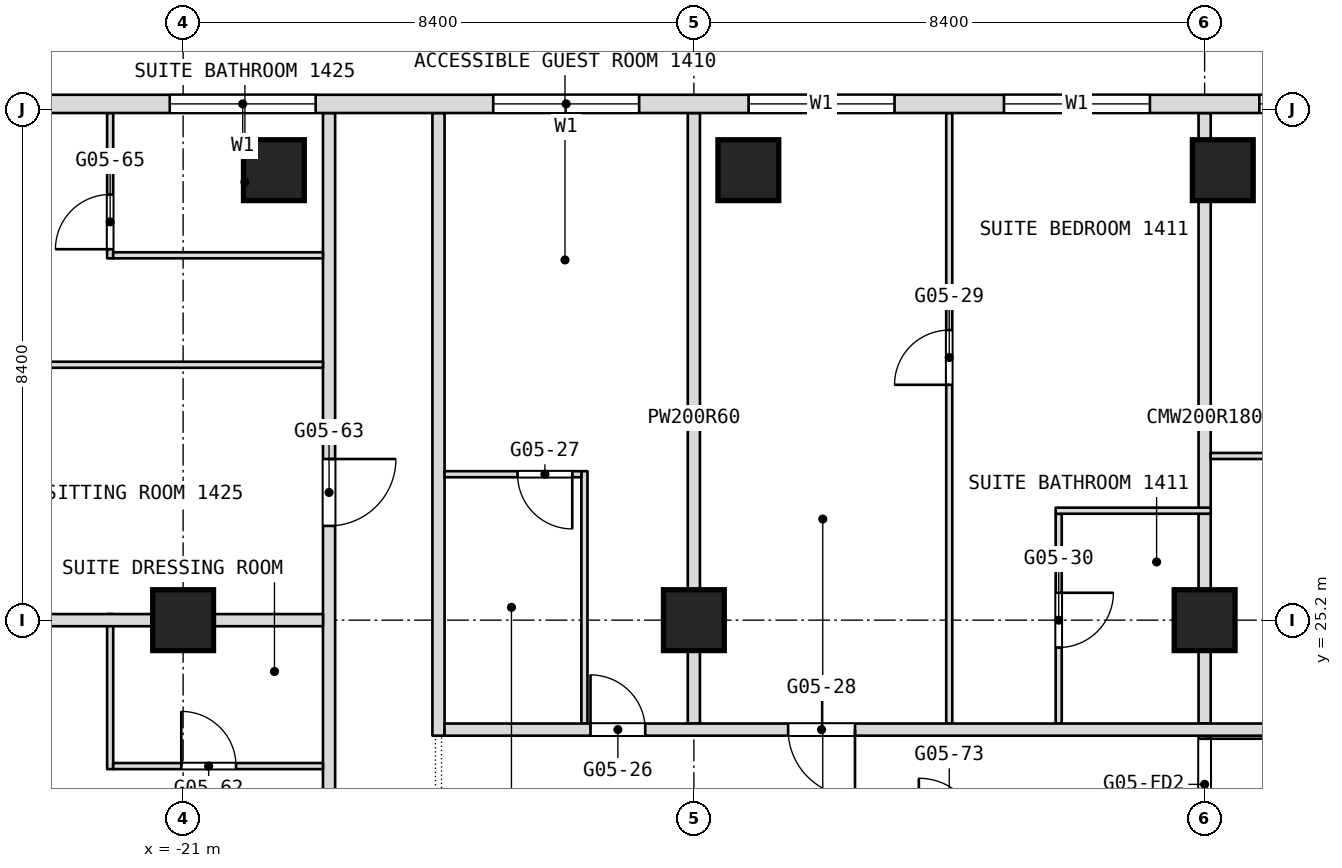
"""IFC4 building model, lengths in metres.
Left out: names, types, materials, properties, quantities, classifications, styles, units other than length and angle.
Written with IfcOpenShell. Run it as: python <this file> out.ifc"""

import sys

from ifc_helpers import new_model, si_unit, direction, frame, frame_2d, origin, origin_2d, place, context, subcontext, project, spatial, rectangle, extrude, element, fill, save


model = new_model("IFC4")
c1 = context("Model", 3, precision=1e-05, world=origin(), true_north=direction((0.0, 1.0)))
c2 = subcontext(c1, "Body", "Model", "MODEL_VIEW")
j1 = project(units=[si_unit("LENGTHUNIT", "METRE"), si_unit("PLANEANGLEUNIT", "RADIAN")], contexts=[c1])
p1 = place(None, origin())
s1 = spatial("IfcSite", under=j1, at=p1, CompositionType="ELEMENT")
p2 = place(p1, origin())
s2 = spatial("IfcBuilding", under=s1, at=p2, CompositionType="ELEMENT")
p3 = place(p2, frame((0.0, 0.0, 65.3)))
s3 = spatial("IfcBuildingStorey", under=s2, at=p3, CompositionType="ELEMENT", Elevation=65.3)
for number, where, z_axis, x_axis in (
    (1, (-21.0, 25.2, 0.0), (0.0, 0.0, 1.0), (1.0, 0.0, 0.0)),
    (2, (-12.6, 25.2, 0.0), (0.0, 0.0, 1.0), (1.0, 0.0, 0.0)),
    (3, (-4.2, 25.2, 0.0), (0.0, 0.0, 1.0), (1.0, 0.0, 0.0)),
    (4, (-19.507, 32.6, 0.0), (0.0, 0.0, 1.0), (1.0, 0.0, 0.0)),
    (5, (-11.704, 32.6, 0.0), (0.0, 0.0, 1.0), (1.0, 0.0, 0.0)),
    (6, (-3.901, 32.6, 0.0), (0.0, 0.0, 1.0), (1.0, 0.0, 0.0)),
):
    element("IfcColumn", number, at=place(p3, frame(where, z_axis=z_axis, x_axis=x_axis)), inside=s3, PredefinedType="COLUMN", context=c2, shape_type="SweptSolid", body=[
        extrude(rectangle(XDim=1.0, YDim=1.0, at=origin_2d()), origin(), (0.0, 0.0, 1.0), 3.6),
    ])
p4 = place(p3, frame((-4.2, 16.8, 0.0), z_axis=(0.0, 0.0, 1.0), x_axis=(0.0, 1.0, 0.0)))
e7 = element("IfcWall", 7, at=p4, inside=s3, PredefinedType="PARTITIONING", context=c2, shape_type="SweptSolid", body=[
    extrude(rectangle(XDim=6.7, YDim=0.2, at=frame_2d((3.35, 0.0))), origin(), (0.0, 0.0, 1.0), 3.34),
])
p5 = place(p4, frame((0.15, 0.0, 0.0)))
e8 = element("IfcOpeningElement", 8, at=p5, cuts=e7, PredefinedType="OPENING", context=c2, shape_type="SweptSolid", body=[
    extrude(rectangle(XDim=1.5, YDim=2.1, at=frame_2d((0.75, 1.05))), frame((0.0, 0.1, 0.0), z_axis=(0.0, -1.0, 0.0), x_axis=(1.0, 0.0, 0.0)), (0.0, 0.0, 1.0), 0.2),
])
p6 = place(p4, frame((4.95, 0.0, 0.0)))
e9 = element("IfcOpeningElement", 9, at=p6, cuts=e7, PredefinedType="OPENING", context=c2, shape_type="SweptSolid", body=[
    extrude(rectangle(XDim=1.5, YDim=2.1, at=frame_2d((0.75, 1.05))), frame((0.0, 0.1, 0.0), z_axis=(0.0, -1.0, 0.0), x_axis=(1.0, 0.0, 0.0)), (0.0, 0.0, 1.0), 0.2),
])
p7 = place(p3, frame((-4.2, 23.5, 0.0), z_axis=(0.0, 0.0, 1.0), x_axis=(0.0, 1.0, 0.0)))
e10 = element("IfcWall", 10, at=p7, inside=s3, PredefinedType="PARTITIONING", context=c2, shape_type="SweptSolid", body=[
    extrude(rectangle(XDim=10.04, YDim=0.2, at=frame_2d((5.02, 0.0))), origin(), (0.0, 0.0, 1.0), 3.34),
])
p8 = place(p3, frame((-6.6, 23.5, 0.0), z_axis=(0.0, 0.0, 1.0), x_axis=(0.0, 1.0, 0.0)))
e11 = element("IfcWall", 11, at=p8, inside=s3, PredefinedType="PARTITIONING", context=c2, shape_type="SweptSolid", body=[
    extrude(rectangle(XDim=3.45, YDim=0.1, at=frame_2d((1.725, 0.0))), origin(), (0.0, 0.0, 1.0), 3.34),
])
p9 = place(p8, frame((1.25, 0.0, 0.0)))
e12 = element("IfcOpeningElement", 12, at=p9, cuts=e11, PredefinedType="OPENING", context=c2, shape_type="SweptSolid", body=[
    extrude(rectangle(XDim=0.9, YDim=2.1, at=frame_2d((0.45, 1.05))), frame((0.0, 0.05, 0.0), z_axis=(0.0, -1.0, 0.0), x_axis=(1.0, 0.0, 0.0)), (0.0, 0.0, 1.0), 0.1),
])
p10 = place(p3, frame((-8.4, 23.5, 0.0), z_axis=(0.0, 0.0, 1.0), x_axis=(0.0, 1.0, 0.0)))
e13 = element("IfcWall", 13, at=p10, inside=s3, PredefinedType="PARTITIONING", context=c2, shape_type="SweptSolid", body=[
    extrude(rectangle(XDim=10.04, YDim=0.1, at=frame_2d((5.02, 0.0))), origin(), (0.0, 0.0, 1.0), 3.34),
])
p11 = place(p10, frame((5.57, 0.0, 0.0)))
e14 = element("IfcOpeningElement", 14, at=p11, cuts=e13, PredefinedType="OPENING", context=c2, shape_type="SweptSolid", body=[
    extrude(rectangle(XDim=0.9, YDim=2.1, at=frame_2d((0.45, 1.05))), frame((0.0, 0.05, 0.0), z_axis=(0.0, -1.0, 0.0), x_axis=(1.0, 0.0, 0.0)), (0.0, 0.0, 1.0), 0.1),
])
p12 = place(p3, frame((-12.6, 23.5, 0.0), z_axis=(0.0, 0.0, 1.0), x_axis=(0.0, 1.0, 0.0)))
e15 = element("IfcWall", 15, at=p12, inside=s3, PredefinedType="PARTITIONING", context=c2, shape_type="SweptSolid", body=[
    extrude(rectangle(XDim=10.04, YDim=0.2, at=frame_2d((5.02, 0.0))), origin(), (0.0, 0.0, 1.0), 3.34),
])
p13 = place(p3, frame((-14.4, 23.5, 0.0), z_axis=(0.0, 0.0, 1.0), x_axis=(0.0, 1.0, 0.0)))
e16 = element("IfcWall", 16, at=p13, inside=s3, PredefinedType="PARTITIONING", context=c2, shape_type="SweptSolid", body=[
    extrude(rectangle(XDim=4.15, YDim=0.1, at=frame_2d((2.075, 0.0))), origin(), (0.0, 0.0, 1.0), 3.34),
])
p14 = place(p3, frame((-16.8, 23.3, 0.0), z_axis=(0.0, 0.0, 1.0), x_axis=(0.0, 1.0, 0.0)))
e17 = element("IfcWall", 17, at=p14, inside=s3, PredefinedType="PARTITIONING", context=c2, shape_type="SweptSolid", body=[
    extrude(rectangle(XDim=10.24, YDim=0.2, at=frame_2d((5.12, 0.0))), origin(), (0.0, 0.0, 1.0), 3.34),
])
p15 = place(p3, frame((-18.6, 18.5, 0.0), z_axis=(0.0, 0.0, 1.0), x_axis=(0.0, 1.0, 0.0)))
e18 = element("IfcWall", 18, at=p15, inside=s3, PredefinedType="PARTITIONING", context=c2, shape_type="SweptSolid", body=[
    extrude(rectangle(XDim=15.04, YDim=0.2, at=frame_2d((7.52, 0.0))), origin(), (0.0, 0.0, 1.0), 3.34),
])
p16 = place(p15, frame((2.0, 0.0, 0.0)))
e19 = element("IfcOpeningElement", 19, at=p16, cuts=e18, PredefinedType="OPENING", context=c2, shape_type="SweptSolid", body=[
    extrude(rectangle(XDim=1.1, YDim=2.1, at=frame_2d((0.55, 1.05))), frame((0.0, 0.1, 0.0), z_axis=(0.0, -1.0, 0.0), x_axis=(1.0, 0.0, 0.0)), (0.0, 0.0, 1.0), 0.2),
])
p17 = place(p15, frame((8.25, 0.0, 0.0)))
e20 = element("IfcOpeningElement", 20, at=p17, cuts=e18, PredefinedType="OPENING", context=c2, shape_type="SweptSolid", body=[
    extrude(rectangle(XDim=1.1, YDim=2.1, at=frame_2d((0.55, 1.05))), frame((0.0, 0.1, 0.0), z_axis=(0.0, -1.0, 0.0), x_axis=(1.0, 0.0, 0.0)), (0.0, 0.0, 1.0), 0.2),
])
p18 = place(p3, frame((-22.2, 22.75, 0.0), z_axis=(0.0, 0.0, 1.0), x_axis=(0.0, 1.0, 0.0)))
e21 = element("IfcWall", 21, at=p18, inside=s3, PredefinedType="PARTITIONING", context=c2, shape_type="SweptSolid", body=[
    extrude(rectangle(XDim=2.55, YDim=0.1, at=frame_2d((1.275, 0.0))), origin(), (0.0, 0.0, 1.0), 3.34),
])
p19 = place(p3, frame((-22.2, 31.15, 0.0), z_axis=(0.0, 0.0, 1.0), x_axis=(0.0, 1.0, 0.0)))
e22 = element("IfcWall", 22, at=p19, inside=s3, PredefinedType="PARTITIONING", context=c2, shape_type="SweptSolid", body=[
    extrude(rectangle(XDim=2.39, YDim=0.1, at=frame_2d((1.195, 0.0))), origin(), (0.0, 0.0, 1.0), 3.34),
])
p20 = place(p19, frame((0.15, 0.0, 0.0)))
e23 = element("IfcOpeningElement", 23, at=p20, cuts=e22, PredefinedType="OPENING", context=c2, shape_type="SweptSolid", body=[
    extrude(rectangle(XDim=0.9, YDim=2.1, at=frame_2d((0.45, 1.05))), frame((0.0, 0.05, 0.0), z_axis=(0.0, -1.0, 0.0), x_axis=(1.0, 0.0, 0.0)), (0.0, 0.0, 1.0), 0.1),
])
p21 = place(p3, frame((-22.15, 22.8, 0.0), z_axis=(0.0, 0.0, 1.0), x_axis=(1.0, 0.0, 0.0)))
e24 = element("IfcWall", 24, at=p21, inside=s3, PredefinedType="PARTITIONING", context=c2, shape_type="SweptSolid", body=[
    extrude(rectangle(XDim=3.45, YDim=0.1, at=frame_2d((1.725, 0.0))), origin(), (0.0, 0.0, 1.0), 3.34),
])
p22 = place(p21, frame((1.12, 0.0, 0.0)))
e25 = element("IfcOpeningElement", 25, at=p22, cuts=e24, PredefinedType="OPENING", context=c2, shape_type="SweptSolid", body=[
    extrude(rectangle(XDim=0.9, YDim=2.1, at=frame_2d((0.45, 1.05))), frame((0.0, 0.05, 0.0), z_axis=(0.0, -1.0, 0.0), x_axis=(1.0, 0.0, 0.0)), (0.0, 0.0, 1.0), 0.1),
])
p23 = place(p3, frame((-16.7, 23.4, 0.0), z_axis=(0.0, 0.0, 1.0), x_axis=(1.0, 0.0, 0.0)))
e26 = element("IfcWall", 26, at=p23, inside=s3, PredefinedType="PARTITIONING", context=c2, shape_type="SweptSolid", body=[
    extrude(rectangle(XDim=23.4, YDim=0.2, at=frame_2d((11.7, 0.0))), origin(), (0.0, 0.0, 1.0), 3.34),
])
p24 = place(p23, frame((2.4, 0.0, 0.0)))
e27 = element("IfcOpeningElement", 27, at=p24, cuts=e26, PredefinedType="OPENING", context=c2, shape_type="SweptSolid", body=[
    extrude(rectangle(XDim=0.9, YDim=2.1, at=frame_2d((0.45, 1.05))), frame((0.0, 0.1, 0.0), z_axis=(0.0, -1.0, 0.0), x_axis=(1.0, 0.0, 0.0)), (0.0, 0.0, 1.0), 0.2),
])
p25 = place(p23, frame((5.65, 0.0, 0.0)))
e28 = element("IfcOpeningElement", 28, at=p25, cuts=e26, PredefinedType="OPENING", context=c2, shape_type="SweptSolid", body=[
    extrude(rectangle(XDim=1.1, YDim=2.1, at=frame_2d((0.55, 1.05))), frame((0.0, 0.1, 0.0), z_axis=(0.0, -1.0, 0.0), x_axis=(1.0, 0.0, 0.0)), (0.0, 0.0, 1.0), 0.2),
])
p26 = place(p23, frame((16.2, 0.0, 0.0)))
e29 = element("IfcOpeningElement", 29, at=p26, cuts=e26, PredefinedType="OPENING", context=c2, shape_type="SweptSolid", body=[
    extrude(rectangle(XDim=1.1, YDim=2.1, at=frame_2d((0.55, 1.05))), frame((0.0, 0.1, 0.0), z_axis=(0.0, -1.0, 0.0), x_axis=(1.0, 0.0, 0.0)), (0.0, 0.0, 1.0), 0.2),
])
p27 = place(p3, frame((-29.7, 25.2, 0.0), z_axis=(0.0, 0.0, 1.0), x_axis=(1.0, 0.0, 0.0)))
e30 = element("IfcWall", 30, at=p27, inside=s3, PredefinedType="PARTITIONING", context=c2, shape_type="SweptSolid", body=[
    extrude(rectangle(XDim=11.0, YDim=0.2, at=frame_2d((5.5, 0.0))), origin(), (0.0, 0.0, 1.0), 2.84),
])
p28 = place(p3, frame((-6.65, 27.0, 0.0), z_axis=(0.0, 0.0, 1.0), x_axis=(1.0, 0.0, 0.0)))
e31 = element("IfcWall", 31, at=p28, inside=s3, PredefinedType="PARTITIONING", context=c2, shape_type="SweptSolid", body=[
    extrude(rectangle(XDim=2.55, YDim=0.1, at=frame_2d((1.275, 0.0))), origin(), (0.0, 0.0, 1.0), 3.34),
])
p29 = place(p3, frame((-16.7, 27.6, 0.0), z_axis=(0.0, 0.0, 1.0), x_axis=(1.0, 0.0, 0.0)))
e32 = element("IfcWall", 32, at=p29, inside=s3, PredefinedType="PARTITIONING", context=c2, shape_type="SweptSolid", body=[
    extrude(rectangle(XDim=2.25, YDim=0.1, at=frame_2d((1.125, 0.0))), origin(), (0.0, 0.0, 1.0), 3.34),
])
p30 = place(p29, frame((1.2, 0.0, 0.0)))
e33 = element("IfcOpeningElement", 33, at=p30, cuts=e32, PredefinedType="OPENING", context=c2, shape_type="SweptSolid", body=[
    extrude(rectangle(XDim=0.9, YDim=2.1, at=frame_2d((0.45, 1.05))), frame((0.0, 0.05, 0.0), z_axis=(0.0, -1.0, 0.0), x_axis=(1.0, 0.0, 0.0)), (0.0, 0.0, 1.0), 0.1),
])
p31 = place(p3, frame((-4.1, 27.9, 0.0), z_axis=(0.0, 0.0, 1.0), x_axis=(1.0, 0.0, 0.0)))
e34 = element("IfcWall", 34, at=p31, inside=s3, PredefinedType="PARTITIONING", context=c2, shape_type="SweptSolid", body=[
    extrude(rectangle(XDim=3.45, YDim=0.1, at=frame_2d((1.725, 0.0))), origin(), (0.0, 0.0, 1.0), 3.34),
])
p32 = place(p31, frame((2.4, 0.0, 0.0)))
e35 = element("IfcOpeningElement", 35, at=p32, cuts=e34, PredefinedType="OPENING", context=c2, shape_type="SweptSolid", body=[
    extrude(rectangle(XDim=0.9, YDim=2.1, at=frame_2d((0.45, 1.05))), frame((0.0, 0.05, 0.0), z_axis=(0.0, -1.0, 0.0), x_axis=(1.0, 0.0, 0.0)), (0.0, 0.0, 1.0), 0.1),
])
p33 = place(p3, frame((-29.393, 29.4, 0.0), z_axis=(0.0, 0.0, 1.0), x_axis=(1.0, 0.0, 0.0)))
e36 = element("IfcWall", 36, at=p33, inside=s3, PredefinedType="PARTITIONING", context=c2, shape_type="SweptSolid", body=[
    extrude(rectangle(XDim=10.693, YDim=0.1, at=frame_2d((5.347, 0.0))), origin(), (0.0, 0.0, 1.0), 3.34),
])
p34 = place(p33, frame((3.863, 0.0, 0.0)))
e37 = element("IfcOpeningElement", 37, at=p34, cuts=e36, PredefinedType="OPENING", context=c2, shape_type="SweptSolid", body=[
    extrude(rectangle(XDim=0.9, YDim=2.1, at=frame_2d((0.45, 1.05))), frame((0.0, 0.05, 0.0), z_axis=(0.0, -1.0, 0.0), x_axis=(1.0, 0.0, 0.0)), (0.0, 0.0, 1.0), 0.1),
])
p35 = place(p3, frame((-22.15, 31.2, 0.0), z_axis=(0.0, 0.0, 1.0), x_axis=(1.0, 0.0, 0.0)))
e38 = element("IfcWall", 38, at=p35, inside=s3, PredefinedType="PARTITIONING", context=c2, shape_type="SweptSolid", body=[
    extrude(rectangle(XDim=3.45, YDim=0.1, at=frame_2d((1.725, 0.0))), origin(), (0.0, 0.0, 1.0), 3.34),
])
p36 = place(p3, frame((23.406, 33.69, 0.0), z_axis=(0.0, 0.0, 1.0), x_axis=(-1.0, 0.0, 0.0)))
e39 = element("IfcWall", 39, at=p36, inside=s3, PredefinedType="NOTDEFINED", context=c2, shape_type="SweptSolid", body=[
    extrude(rectangle(XDim=46.812, YDim=0.3, at=frame_2d((23.406, 0.0))), origin(), (0.0, 0.0, 1.0), 3.6),
])
p37 = place(p36, frame((2.186, 0.0, 0.9)))
e40 = element("IfcOpeningElement", 40, at=p37, cuts=e39, PredefinedType="OPENING", context=c2, shape_type="SweptSolid", body=[
    extrude(rectangle(XDim=2.4, YDim=2.1, at=frame_2d((1.2, 1.05))), frame((0.0, 0.15, 0.0), z_axis=(0.0, -1.0, 0.0), x_axis=(1.0, 0.0, 0.0)), (0.0, 0.0, 1.0), 0.3),
])
p38 = place(p36, frame((7.506, 0.0, 0.9)))
e41 = element("IfcOpeningElement", 41, at=p38, cuts=e39, PredefinedType="OPENING", context=c2, shape_type="SweptSolid", body=[
    extrude(rectangle(XDim=2.4, YDim=2.1, at=frame_2d((1.2, 1.05))), frame((0.0, 0.15, 0.0), z_axis=(0.0, -1.0, 0.0), x_axis=(1.0, 0.0, 0.0)), (0.0, 0.0, 1.0), 0.3),
])
p39 = place(p36, frame((11.706, 0.0, 0.9)))
e42 = element("IfcOpeningElement", 42, at=p39, cuts=e39, PredefinedType="OPENING", context=c2, shape_type="SweptSolid", body=[
    extrude(rectangle(XDim=2.4, YDim=2.1, at=frame_2d((1.2, 1.05))), frame((0.0, 0.15, 0.0), z_axis=(0.0, -1.0, 0.0), x_axis=(1.0, 0.0, 0.0)), (0.0, 0.0, 1.0), 0.3),
])
p40 = place(p36, frame((15.906, 0.0, 0.9)))
e43 = element("IfcOpeningElement", 43, at=p40, cuts=e39, PredefinedType="OPENING", context=c2, shape_type="SweptSolid", body=[
    extrude(rectangle(XDim=2.4, YDim=2.1, at=frame_2d((1.2, 1.05))), frame((0.0, 0.15, 0.0), z_axis=(0.0, -1.0, 0.0), x_axis=(1.0, 0.0, 0.0)), (0.0, 0.0, 1.0), 0.3),
])
p41 = place(p36, frame((20.106, 0.0, 0.9)))
e44 = element("IfcOpeningElement", 44, at=p41, cuts=e39, PredefinedType="OPENING", context=c2, shape_type="SweptSolid", body=[
    extrude(rectangle(XDim=2.4, YDim=2.1, at=frame_2d((1.2, 1.05))), frame((0.0, 0.15, 0.0), z_axis=(0.0, -1.0, 0.0), x_axis=(1.0, 0.0, 0.0)), (0.0, 0.0, 1.0), 0.3),
])
p42 = place(p36, frame((24.306, 0.0, 0.9)))
e45 = element("IfcOpeningElement", 45, at=p42, cuts=e39, PredefinedType="OPENING", context=c2, shape_type="SweptSolid", body=[
    extrude(rectangle(XDim=2.4, YDim=2.1, at=frame_2d((1.2, 1.05))), frame((0.0, 0.15, 0.0), z_axis=(0.0, -1.0, 0.0), x_axis=(1.0, 0.0, 0.0)), (0.0, 0.0, 1.0), 0.3),
])
p43 = place(p36, frame((28.506, 0.0, 0.9)))
e46 = element("IfcOpeningElement", 46, at=p43, cuts=e39, PredefinedType="OPENING", context=c2, shape_type="SweptSolid", body=[
    extrude(rectangle(XDim=2.4, YDim=2.1, at=frame_2d((1.2, 1.05))), frame((0.0, 0.15, 0.0), z_axis=(0.0, -1.0, 0.0), x_axis=(1.0, 0.0, 0.0)), (0.0, 0.0, 1.0), 0.3),
])
p44 = place(p36, frame((32.706, 0.0, 0.9)))
e47 = element("IfcOpeningElement", 47, at=p44, cuts=e39, PredefinedType="OPENING", context=c2, shape_type="SweptSolid", body=[
    extrude(rectangle(XDim=2.4, YDim=2.1, at=frame_2d((1.2, 1.05))), frame((0.0, 0.15, 0.0), z_axis=(0.0, -1.0, 0.0), x_axis=(1.0, 0.0, 0.0)), (0.0, 0.0, 1.0), 0.3),
])
p45 = place(p36, frame((36.906, 0.0, 0.9)))
e48 = element("IfcOpeningElement", 48, at=p45, cuts=e39, PredefinedType="OPENING", context=c2, shape_type="SweptSolid", body=[
    extrude(rectangle(XDim=2.4, YDim=2.1, at=frame_2d((1.2, 1.05))), frame((0.0, 0.15, 0.0), z_axis=(0.0, -1.0, 0.0), x_axis=(1.0, 0.0, 0.0)), (0.0, 0.0, 1.0), 0.3),
])
p46 = place(p36, frame((42.226, 0.0, 0.9)))
e49 = element("IfcOpeningElement", 49, at=p46, cuts=e39, PredefinedType="OPENING", context=c2, shape_type="SweptSolid", body=[
    extrude(rectangle(XDim=2.4, YDim=2.1, at=frame_2d((1.2, 1.05))), frame((0.0, 0.15, 0.0), z_axis=(0.0, -1.0, 0.0), x_axis=(1.0, 0.0, 0.0)), (0.0, 0.0, 1.0), 0.3),
])
p47 = place(p9, origin())
e50 = element("IfcDoor", 50, at=p47, inside=s3, OperationType="SINGLE_SWING_RIGHT", PredefinedType="DOOR", context=c2, shape_type="SweptSolid", body=[
    extrude(rectangle(XDim=0.9, YDim=2.1, at=frame_2d((0.45, 1.05))), frame((0.0, 0.025, 0.0), z_axis=(0.0, -1.0, 0.0), x_axis=(1.0, 0.0, 0.0)), (0.0, 0.0, 1.0), 0.05),
])
fill(e12, e50)
p48 = place(p11, origin())
e51 = element("IfcDoor", 51, at=p48, inside=s3, OperationType="SINGLE_SWING_RIGHT", PredefinedType="DOOR", context=c2, shape_type="SweptSolid", body=[
    extrude(rectangle(XDim=0.9, YDim=2.1, at=frame_2d((0.45, 1.05))), frame((0.0, 0.025, 0.0), z_axis=(0.0, -1.0, 0.0), x_axis=(1.0, 0.0, 0.0)), (0.0, 0.0, 1.0), 0.05),
])
fill(e14, e51)
p49 = place(p17, origin())
e52 = element("IfcDoor", 52, at=p49, inside=s3, OperationType="SINGLE_SWING_RIGHT", PredefinedType="DOOR", context=c2, shape_type="SweptSolid", body=[
    extrude(rectangle(XDim=1.1, YDim=2.1, at=frame_2d((0.55, 1.05))), frame((0.0, 0.025, 0.0), z_axis=(0.0, -1.0, 0.0), x_axis=(1.0, 0.0, 0.0)), (0.0, 0.0, 1.0), 0.05),
])
fill(e20, e52)
p50 = place(p20, origin())
e53 = element("IfcDoor", 53, at=p50, inside=s3, OperationType="SINGLE_SWING_RIGHT", PredefinedType="DOOR", context=c2, shape_type="SweptSolid", body=[
    extrude(rectangle(XDim=0.9, YDim=2.1, at=frame_2d((0.45, 1.05))), frame((0.0, 0.025, 0.0), z_axis=(0.0, -1.0, 0.0), x_axis=(1.0, 0.0, 0.0)), (0.0, 0.0, 1.0), 0.05),
])
fill(e23, e53)
p51 = place(p22, origin())
e54 = element("IfcDoor", 54, at=p51, inside=s3, OperationType="SINGLE_SWING_LEFT", PredefinedType="DOOR", context=c2, shape_type="SweptSolid", body=[
    extrude(rectangle(XDim=0.9, YDim=2.1, at=frame_2d((0.45, 1.05))), frame((0.0, 0.025, 0.0), z_axis=(0.0, -1.0, 0.0), x_axis=(1.0, 0.0, 0.0)), (0.0, 0.0, 1.0), 0.05),
])
fill(e25, e54)
p52 = place(p24, origin())
e55 = element("IfcDoor", 55, at=p52, inside=s3, OperationType="SINGLE_SWING_LEFT", PredefinedType="DOOR", context=c2, shape_type="SweptSolid", body=[
    extrude(rectangle(XDim=0.9, YDim=2.1, at=frame_2d((0.45, 1.05))), frame((0.0, 0.025, 0.0), z_axis=(0.0, -1.0, 0.0), x_axis=(1.0, 0.0, 0.0)), (0.0, 0.0, 1.0), 0.05),
])
fill(e27, e55)
p53 = place(p25, origin())
e56 = element("IfcDoor", 56, at=p53, inside=s3, OperationType="SINGLE_SWING_LEFT", PredefinedType="DOOR", context=c2, shape_type="SweptSolid", body=[
    extrude(rectangle(XDim=1.1, YDim=2.1, at=frame_2d((0.55, 1.05))), frame((0.0, 0.025, 0.0), z_axis=(0.0, -1.0, 0.0), x_axis=(1.0, 0.0, 0.0)), (0.0, 0.0, 1.0), 0.05),
])
fill(e28, e56)
p54 = place(p30, origin())
e57 = element("IfcDoor", 57, at=p54, inside=s3, OperationType="SINGLE_SWING_LEFT", PredefinedType="DOOR", context=c2, shape_type="SweptSolid", body=[
    extrude(rectangle(XDim=0.9, YDim=2.1, at=frame_2d((0.45, 1.05))), frame((0.0, 0.025, 0.0), z_axis=(0.0, -1.0, 0.0), x_axis=(1.0, 0.0, 0.0)), (0.0, 0.0, 1.0), 0.05),
])
fill(e33, e57)
p55 = place(p42, origin())
e58 = element("IfcWindow", 58, at=p55, inside=s3, PartitioningType="SINGLE_PANEL", PredefinedType="WINDOW", context=c2, shape_type="SweptSolid", body=[
    extrude(rectangle(XDim=2.4, YDim=2.1, at=frame_2d((1.2, 1.05))), frame((0.0, 0.03, 0.0), z_axis=(0.0, -1.0, 0.0), x_axis=(1.0, 0.0, 0.0)), (0.0, 0.0, 1.0), 0.06),
])
fill(e45, e58)
p56 = place(p43, origin())
e59 = element("IfcWindow", 59, at=p56, inside=s3, PartitioningType="SINGLE_PANEL", PredefinedType="WINDOW", context=c2, shape_type="SweptSolid", body=[
    extrude(rectangle(XDim=2.4, YDim=2.1, at=frame_2d((1.2, 1.05))), frame((0.0, 0.03, 0.0), z_axis=(0.0, -1.0, 0.0), x_axis=(1.0, 0.0, 0.0)), (0.0, 0.0, 1.0), 0.06),
])
fill(e46, e59)
p57 = place(p44, origin())
e60 = element("IfcWindow", 60, at=p57, inside=s3, PartitioningType="SINGLE_PANEL", PredefinedType="WINDOW", context=c2, shape_type="SweptSolid", body=[
    extrude(rectangle(XDim=2.4, YDim=2.1, at=frame_2d((1.2, 1.05))), frame((0.0, 0.03, 0.0), z_axis=(0.0, -1.0, 0.0), x_axis=(1.0, 0.0, 0.0)), (0.0, 0.0, 1.0), 0.06),
])
fill(e47, e60)
p58 = place(p45, origin())
e61 = element("IfcWindow", 61, at=p58, inside=s3, PartitioningType="SINGLE_PANEL", PredefinedType="WINDOW", context=c2, shape_type="SweptSolid", body=[
    extrude(rectangle(XDim=2.4, YDim=2.1, at=frame_2d((1.2, 1.05))), frame((0.0, 0.03, 0.0), z_axis=(0.0, -1.0, 0.0), x_axis=(1.0, 0.0, 0.0)), (0.0, 0.0, 1.0), 0.06),
])
fill(e48, e61)
p59 = place(p46, origin())
e62 = element("IfcWindow", 62, at=p59, inside=s3, PartitioningType="SINGLE_PANEL", PredefinedType="WINDOW", context=c2, shape_type="SweptSolid", body=[
    extrude(rectangle(XDim=2.4, YDim=2.1, at=frame_2d((1.2, 1.05))), frame((0.0, 0.03, 0.0), z_axis=(0.0, -1.0, 0.0), x_axis=(1.0, 0.0, 0.0)), (0.0, 0.0, 1.0), 0.06),
])
fill(e49, e62)
p60 = place(p6, origin())
e63 = element("IfcDoor", 63, at=p60, inside=s3, OperationType="DOUBLE_DOOR_DOUBLE_SWING", PredefinedType="DOOR", context=c2, shape_type="SweptSolid", body=[
    extrude(rectangle(XDim=1.5, YDim=2.1, at=frame_2d((0.75, 1.05))), frame((0.0, 0.025, 0.0), z_axis=(0.0, -1.0, 0.0), x_axis=(1.0, 0.0, 0.0)), (0.0, 0.0, 1.0), 0.05),
])
fill(e9, e63)
save(model, sys.argv[1])
